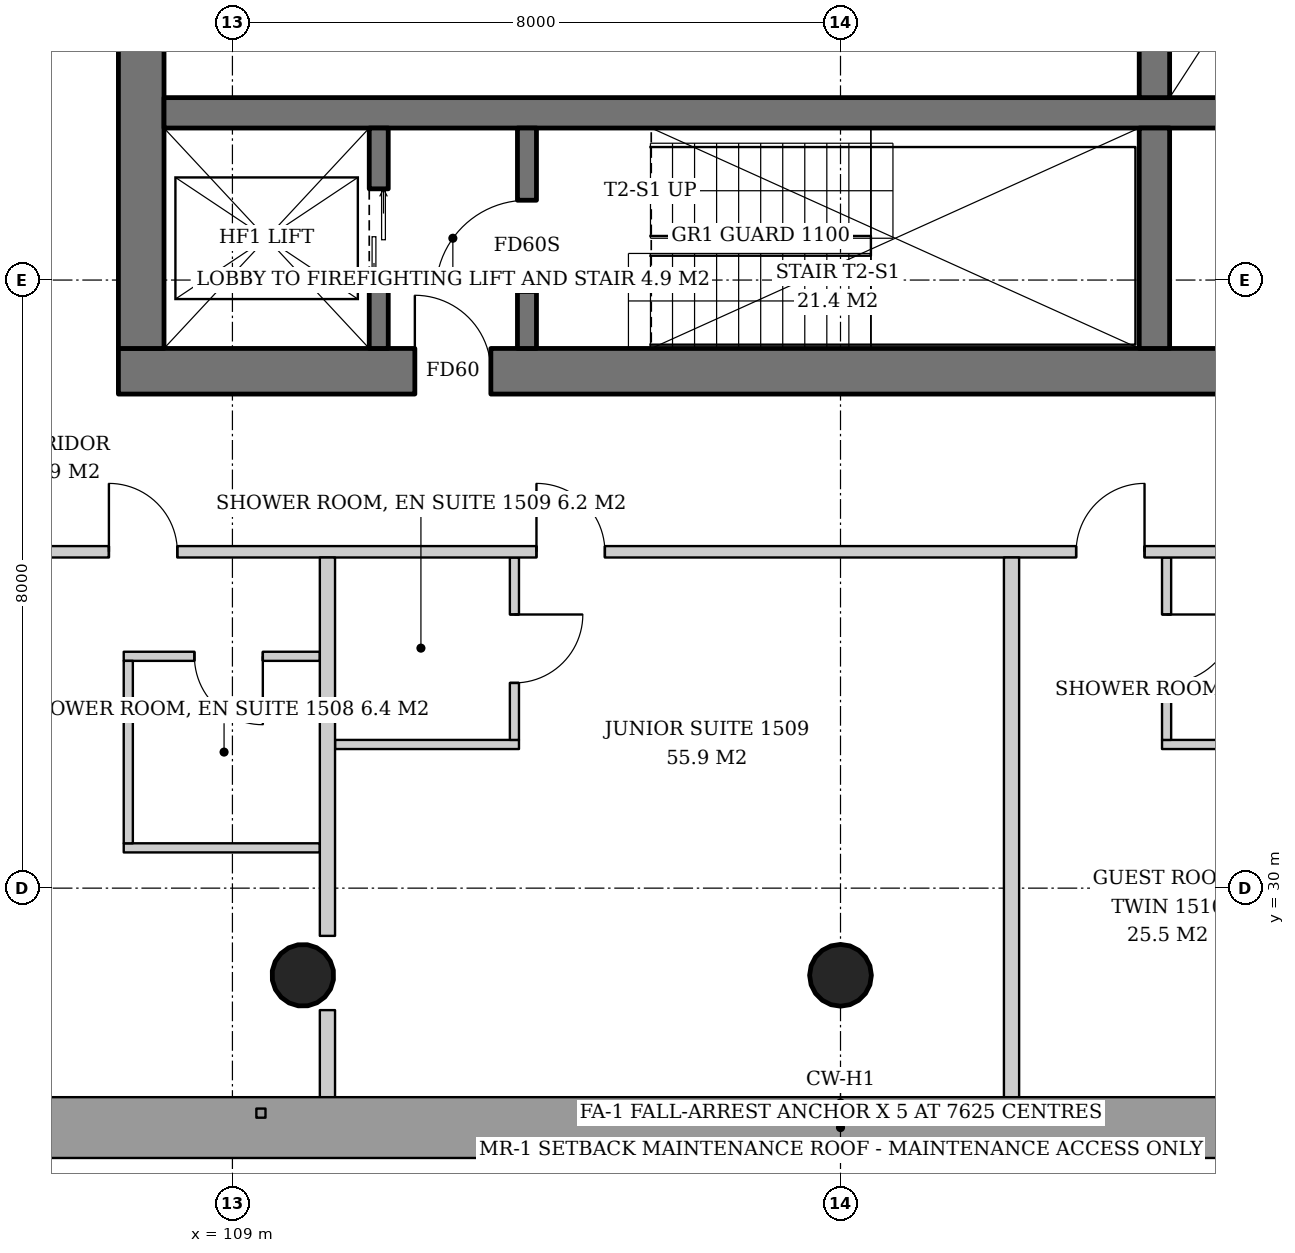
"""IFC4 building model, lengths in metres.
Left out: names, types, materials, properties, quantities, classifications, styles, units other than length and angle.
Written with IfcOpenShell. Run it as: python <this file> out.ifc"""

import sys

from ifc_helpers import new_model, si_unit, direction, frame, frame_2d, origin, origin_2d, place, context, subcontext, project, spatial, rectangle, hollow_circle, extrude, element, fill, save


model = new_model("IFC4")
c1 = context("Model", 3, precision=1e-05, world=origin(), true_north=direction((0.0, 1.0)))
c2 = subcontext(c1, "Body", "Model", "MODEL_VIEW")
j1 = project(units=[si_unit("LENGTHUNIT", "METRE"), si_unit("PLANEANGLEUNIT", "RADIAN")], contexts=[c1])
p1 = place(None, origin())
s1 = spatial("IfcSite", under=j1, at=p1, CompositionType="ELEMENT")
p2 = place(p1, origin())
s2 = spatial("IfcBuilding", under=s1, at=p2, CompositionType="ELEMENT")
p3 = place(p2, frame((0.0, 0.0, 62.8)))
s3 = spatial("IfcBuildingStorey", under=s2, at=p3, CompositionType="ELEMENT", Elevation=62.8)
p4 = place(p3, frame((109.901, 28.802, 0.0), z_axis=(0.021497706284, 0.043059584825, 0.998841188968), x_axis=(-0.894693706707, 0.446680166538, 0.0)))
e1 = element("IfcColumn", 1, at=p4, inside=s3, PredefinedType="COLUMN", context=c2, shape_type="SweptSolid", body=[
    extrude(hollow_circle(Radius=0.406, WallThickness=0.03, at=origin_2d()), origin(), (0.0, 0.0, 1.0), 3.804),
])
p5 = place(p3, frame((117.0, 28.802, 0.0), z_axis=(0.0, 0.043069538298, 0.999072076915), x_axis=(-1.0, 0.0, 0.0)))
e2 = element("IfcColumn", 2, at=p5, inside=s3, PredefinedType="COLUMN", context=c2, shape_type="SweptSolid", body=[
    extrude(hollow_circle(Radius=0.406, WallThickness=0.03, at=origin_2d()), origin(), (0.0, 0.0, 1.0), 3.803),
])
p6 = place(p3, frame((107.5, 36.8, 0.0), z_axis=(0.0, 0.0, 1.0), x_axis=(1.0, 0.0, 0.0)))
e3 = element("IfcWall", 3, at=p6, inside=s3, PredefinedType="SHEAR", context=c2, shape_type="SweptSolid", body=[
    extrude(rectangle(XDim=19.0, YDim=0.6, at=frame_2d((9.5, 0.0))), origin(), (0.0, 0.0, 1.0), 3.8),
])
p7 = place(p6, frame((3.9, 0.0, 0.0)))
e4 = element("IfcOpeningElement", 4, at=p7, cuts=e3, PredefinedType="OPENING", context=c2, shape_type="SweptSolid", body=[
    extrude(rectangle(XDim=1.0, YDim=2.1, at=frame_2d((0.5, 1.05))), frame((0.0, 0.31, 0.0), z_axis=(0.0, -1.0, 0.0), x_axis=(1.0, 0.0, 0.0)), (0.0, 0.0, 1.0), 0.62),
])
p8 = place(p6, frame((15.615, 0.0, 0.0)))
e5 = element("IfcOpeningElement", 5, at=p8, cuts=e3, PredefinedType="OPENING", context=c2, shape_type="SweptSolid", body=[
    extrude(rectangle(XDim=1.0, YDim=2.1, at=frame_2d((0.5, 1.05))), frame((0.0, 0.31, 0.0), z_axis=(0.0, -1.0, 0.0), x_axis=(1.0, 0.0, 0.0)), (0.0, 0.0, 1.0), 0.62),
])
p9 = place(p3, frame((107.8, 37.1, 0.0), z_axis=(0.0, 0.0, 1.0), x_axis=(0.0, 1.0, 0.0)))
e6 = element("IfcWall", 6, at=p9, inside=s3, PredefinedType="SHEAR", context=c2, shape_type="SweptSolid", body=[
    extrude(rectangle(XDim=17.8, YDim=0.6, at=frame_2d((8.9, 0.0))), origin(), (0.0, 0.0, 1.0), 3.8),
])
p10 = place(p9, frame((8.0, 0.0, 0.0)))
e7 = element("IfcOpeningElement", 7, at=p10, cuts=e6, PredefinedType="OPENING", context=c2, shape_type="SweptSolid", body=[
    extrude(rectangle(XDim=1.8, YDim=2.4, at=frame_2d((0.9, 1.2))), frame((0.0, 0.31, 0.0), z_axis=(0.0, -1.0, 0.0), x_axis=(1.0, 0.0, 0.0)), (0.0, 0.0, 1.0), 0.62),
])
p11 = place(p3, frame((108.1, 40.2, 0.0), z_axis=(0.0, 0.0, 1.0), x_axis=(1.0, 0.0, 0.0)))
e8 = element("IfcWall", 8, at=p11, inside=s3, PredefinedType="SHEAR", context=c2, shape_type="SweptSolid", body=[
    extrude(rectangle(XDim=17.8, YDim=0.4, at=frame_2d((8.9, 0.0))), origin(), (0.0, 0.0, 1.0), 3.8),
])
p12 = place(p3, frame((121.13, 37.1, 0.0), z_axis=(0.0, 0.0, 1.0), x_axis=(0.0, 1.0, 0.0)))
e9 = element("IfcWall", 9, at=p12, inside=s3, PredefinedType="SHEAR", context=c2, shape_type="SweptSolid", body=[
    extrude(rectangle(XDim=2.9, YDim=0.4, at=frame_2d((1.45, 0.0))), origin(), (0.0, 0.0, 1.0), 3.8),
])
p13 = place(p3, frame((121.13, 40.4, 0.0), z_axis=(0.0, 0.0, 1.0), x_axis=(0.0, 1.0, 0.0)))
e10 = element("IfcWall", 10, at=p13, inside=s3, PredefinedType="SHEAR", context=c2, shape_type="SweptSolid", body=[
    extrude(rectangle(XDim=11.2, YDim=0.4, at=frame_2d((5.6, 0.0))), origin(), (0.0, 0.0, 1.0), 3.8),
])
p14 = place(p3, frame((110.925, 37.1, 0.0), z_axis=(0.0, 0.0, 1.0), x_axis=(0.0, 1.0, 0.0)))
e11 = element("IfcWall", 11, at=p14, inside=s3, PredefinedType="SHEAR", context=c2, shape_type="SweptSolid", body=[
    extrude(rectangle(XDim=2.9, YDim=0.25, at=frame_2d((1.45, 0.0))), origin(), (0.0, 0.0, 1.0), 3.8),
])
p15 = place(p14, frame((0.8, 0.0, 0.0)))
e12 = element("IfcOpeningElement", 12, at=p15, cuts=e11, PredefinedType="OPENING", context=c2, shape_type="SweptSolid", body=[
    extrude(rectangle(XDim=1.3, YDim=2.2, at=frame_2d((0.65, 1.1))), frame((0.0, 0.135, 0.0), z_axis=(0.0, -1.0, 0.0), x_axis=(1.0, 0.0, 0.0)), (0.0, 0.0, 1.0), 0.27),
])
p16 = place(p3, frame((112.875, 37.1, 0.0), z_axis=(0.0, 0.0, 1.0), x_axis=(0.0, 1.0, 0.0)))
e13 = element("IfcWall", 13, at=p16, inside=s3, PredefinedType="SHEAR", context=c2, shape_type="SweptSolid", body=[
    extrude(rectangle(XDim=2.9, YDim=0.25, at=frame_2d((1.45, 0.0))), origin(), (0.0, 0.0, 1.0), 3.8),
])
p17 = place(p16, frame((0.75, 0.0, 0.0)))
e14 = element("IfcOpeningElement", 14, at=p17, cuts=e13, PredefinedType="OPENING", context=c2, shape_type="SweptSolid", body=[
    extrude(rectangle(XDim=1.2, YDim=2.1, at=frame_2d((0.6, 1.05))), frame((0.0, 0.135, 0.0), z_axis=(0.0, -1.0, 0.0), x_axis=(1.0, 0.0, 0.0)), (0.0, 0.0, 1.0), 0.27),
])
p18 = place(p3, frame((110.15, 33.05, 0.0), z_axis=(0.0, 0.0, 1.0), x_axis=(-1.0, 0.0, 0.0)))
e15 = element("IfcWall", 15, at=p18, inside=s3, PredefinedType="PARTITIONING", context=c2, shape_type="SweptSolid", body=[
    extrude(rectangle(XDim=2.58, YDim=0.12, at=frame_2d((1.29, 0.0))), origin(), (0.0, 0.0, 1.0), 2.8),
])
p19 = place(p18, frame((0.75, 0.0, 0.0)))
e16 = element("IfcOpeningElement", 16, at=p19, cuts=e15, PredefinedType="OPENING", context=c2, shape_type="SweptSolid", body=[
    extrude(rectangle(XDim=0.9, YDim=2.1, at=frame_2d((0.45, 1.05))), frame((0.0, 0.07, 0.0), z_axis=(0.0, -1.0, 0.0), x_axis=(1.0, 0.0, 0.0)), (0.0, 0.0, 1.0), 0.14),
])
p20 = place(p3, frame((110.15, 30.53, 0.0), z_axis=(0.0, 0.0, 1.0), x_axis=(-1.0, 0.0, 0.0)))
e17 = element("IfcWall", 17, at=p20, inside=s3, PredefinedType="PARTITIONING", context=c2, shape_type="SweptSolid", body=[
    extrude(rectangle(XDim=2.58, YDim=0.12, at=frame_2d((1.29, 0.0))), origin(), (0.0, 0.0, 1.0), 2.8),
])
p21 = place(p3, frame((107.63, 32.99, 0.0), z_axis=(0.0, 0.0, 1.0), x_axis=(0.0, -1.0, 0.0)))
e18 = element("IfcWall", 18, at=p21, inside=s3, PredefinedType="PARTITIONING", context=c2, shape_type="SweptSolid", body=[
    extrude(rectangle(XDim=2.4, YDim=0.12, at=frame_2d((1.2, 0.0))), origin(), (0.0, 0.0, 1.0), 2.8),
])
p22 = place(p3, frame((110.35, 31.89, 0.0), z_axis=(0.0, 0.0, 1.0), x_axis=(1.0, 0.0, 0.0)))
e19 = element("IfcWall", 19, at=p22, inside=s3, PredefinedType="PARTITIONING", context=c2, shape_type="SweptSolid", body=[
    extrude(rectangle(XDim=2.42, YDim=0.12, at=frame_2d((1.21, 0.0))), origin(), (0.0, 0.0, 1.0), 2.847),
])
p23 = place(p3, frame((112.71, 34.35, 0.0), z_axis=(0.0, 0.0, 1.0), x_axis=(0.0, -1.0, 0.0)))
e20 = element("IfcWall", 20, at=p23, inside=s3, PredefinedType="PARTITIONING", context=c2, shape_type="SweptSolid", body=[
    extrude(rectangle(XDim=2.4, YDim=0.12, at=frame_2d((1.2, 0.0))), origin(), (0.0, 0.0, 1.0), 3.6),
])
p24 = place(p23, frame((0.75, 0.0, 0.0)))
e21 = element("IfcOpeningElement", 21, at=p24, cuts=e20, PredefinedType="OPENING", context=c2, shape_type="SweptSolid", body=[
    extrude(rectangle(XDim=0.9, YDim=2.1, at=frame_2d((0.45, 1.05))), frame((0.0, 0.07, 0.0), z_axis=(0.0, -1.0, 0.0), x_axis=(1.0, 0.0, 0.0)), (0.0, 0.0, 1.0), 0.14),
])
p25 = place(p3, frame((121.23, 31.89, 0.0), z_axis=(0.0, 0.0, 1.0), x_axis=(1.0, 0.0, 0.0)))
e22 = element("IfcWall", 22, at=p25, inside=s3, PredefinedType="PARTITIONING", context=c2, shape_type="SweptSolid", body=[
    extrude(rectangle(XDim=2.42, YDim=0.12, at=frame_2d((1.21, 0.0))), origin(), (0.0, 0.0, 1.0), 3.6),
])
p26 = place(p3, frame((121.29, 34.35, 0.0), z_axis=(0.0, 0.0, 1.0), x_axis=(0.0, -1.0, 0.0)))
e23 = element("IfcWall", 23, at=p26, inside=s3, PredefinedType="PARTITIONING", context=c2, shape_type="SweptSolid", body=[
    extrude(rectangle(XDim=2.4, YDim=0.12, at=frame_2d((1.2, 0.0))), origin(), (0.0, 0.0, 1.0), 3.6),
])
p27 = place(p26, frame((0.75, 0.0, 0.0)))
e24 = element("IfcOpeningElement", 24, at=p27, cuts=e23, PredefinedType="OPENING", context=c2, shape_type="SweptSolid", body=[
    extrude(rectangle(XDim=0.9, YDim=2.1, at=frame_2d((0.45, 1.05))), frame((0.0, 0.07, 0.0), z_axis=(0.0, -1.0, 0.0), x_axis=(1.0, 0.0, 0.0)), (0.0, 0.0, 1.0), 0.14),
])
p28 = place(p3, frame((105.35, 34.425, 0.0), z_axis=(0.0, 0.0, 1.0), x_axis=(1.0, 0.0, 0.0)))
e25 = element("IfcWall", 25, at=p28, inside=s3, PredefinedType="PARTITIONING", context=c2, shape_type="SweptSolid", body=[
    extrude(rectangle(XDim=23.15, YDim=0.15, at=frame_2d((11.575, 0.0))), origin(), (0.0, 0.0, 1.0), 2.8),
])
p29 = place(p28, frame((2.025, 0.0, 0.0)))
e26 = element("IfcOpeningElement", 26, at=p29, cuts=e25, PredefinedType="OPENING", context=c2, shape_type="SweptSolid", body=[
    extrude(rectangle(XDim=0.9, YDim=2.1, at=frame_2d((0.45, 1.05))), frame((0.0, 0.085, 0.0), z_axis=(0.0, -1.0, 0.0), x_axis=(1.0, 0.0, 0.0)), (0.0, 0.0, 1.0), 0.17),
])
p30 = place(p28, frame((7.65, 0.0, 0.0)))
e27 = element("IfcOpeningElement", 27, at=p30, cuts=e25, PredefinedType="OPENING", context=c2, shape_type="SweptSolid", body=[
    extrude(rectangle(XDim=0.9, YDim=2.1, at=frame_2d((0.45, 1.05))), frame((0.0, 0.085, 0.0), z_axis=(0.0, -1.0, 0.0), x_axis=(1.0, 0.0, 0.0)), (0.0, 0.0, 1.0), 0.17),
])
p31 = place(p28, frame((14.75, 0.0, 0.0)))
e28 = element("IfcOpeningElement", 28, at=p31, cuts=e25, PredefinedType="OPENING", context=c2, shape_type="SweptSolid", body=[
    extrude(rectangle(XDim=0.9, YDim=2.1, at=frame_2d((0.45, 1.05))), frame((0.0, 0.085, 0.0), z_axis=(0.0, -1.0, 0.0), x_axis=(1.0, 0.0, 0.0)), (0.0, 0.0, 1.0), 0.17),
])
p32 = place(p3, frame((110.25, 34.35, 0.0), z_axis=(0.0, 0.0, 1.0), x_axis=(0.0, -1.0, 0.0)))
e29 = element("IfcWall", 29, at=p32, inside=s3, PredefinedType="PARTITIONING", context=c2, shape_type="SweptSolid", body=[
    extrude(rectangle(XDim=4.978, YDim=0.2, at=frame_2d((2.489, 0.0))), origin(), (0.0, 0.0, 1.0), 3.6),
])
p33 = place(p3, frame((110.25, 28.395, 0.0), z_axis=(0.0, 0.0, 1.0), x_axis=(0.0, -1.0, 0.0)))
e30 = element("IfcWall", 30, at=p33, inside=s3, PredefinedType="PARTITIONING", context=c2, shape_type="SweptSolid", body=[
    extrude(rectangle(XDim=1.185, YDim=0.2, at=frame_2d((0.593, 0.0))), origin(), (0.0, 0.0, 1.0), 3.6),
])
p34 = place(p3, frame((119.25, 34.35, 0.0), z_axis=(0.0, 0.0, 1.0), x_axis=(0.0, -1.0, 0.0)))
e31 = element("IfcWall", 31, at=p34, inside=s3, PredefinedType="PARTITIONING", context=c2, shape_type="SweptSolid", body=[
    extrude(rectangle(XDim=7.14, YDim=0.2, at=frame_2d((3.57, 0.0))), origin(), (0.0, 0.0, 1.0), 3.05),
])
p35 = place(p15, origin())
e32 = element("IfcDoor", 32, at=p35, inside=s3, OperationType="DOUBLE_DOOR_SLIDING", PredefinedType="DOOR", context=c2, shape_type="SweptSolid", body=[
    extrude(rectangle(XDim=1.3, YDim=2.2, at=frame_2d((0.65, 1.1))), frame((0.0, 0.025, 0.0), z_axis=(0.0, -1.0, 0.0), x_axis=(1.0, 0.0, 0.0)), (0.0, 0.0, 1.0), 0.05),
])
fill(e12, e32)
p36 = place(p17, origin())
e33 = element("IfcDoor", 33, at=p36, inside=s3, OperationType="SINGLE_SWING_LEFT", PredefinedType="DOOR", context=c2, shape_type="SweptSolid", body=[
    extrude(rectangle(XDim=1.2, YDim=2.1, at=frame_2d((0.6, 1.05))), frame((0.0, 0.025, 0.0), z_axis=(0.0, -1.0, 0.0), x_axis=(1.0, 0.0, 0.0)), (0.0, 0.0, 1.0), 0.05),
])
fill(e14, e33)
p37 = place(p7, origin())
e34 = element("IfcDoor", 34, at=p37, inside=s3, OperationType="SINGLE_SWING_LEFT", PredefinedType="DOOR", context=c2, shape_type="SweptSolid", body=[
    extrude(rectangle(XDim=1.0, YDim=2.1, at=frame_2d((0.5, 1.05))), frame((0.0, 0.025, 0.0), z_axis=(0.0, -1.0, 0.0), x_axis=(1.0, 0.0, 0.0)), (0.0, 0.0, 1.0), 0.05),
])
fill(e4, e34)
p38 = place(p19, origin())
e35 = element("IfcDoor", 35, at=p38, inside=s3, OperationType="SINGLE_SWING_LEFT", PredefinedType="DOOR", context=c2, shape_type="SweptSolid", body=[
    extrude(rectangle(XDim=0.9, YDim=2.1, at=frame_2d((0.45, 1.05))), frame((0.0, 0.025, 0.0), z_axis=(0.0, -1.0, 0.0), x_axis=(1.0, 0.0, 0.0)), (0.0, 0.0, 1.0), 0.05),
])
fill(e16, e35)
p39 = place(p24, origin())
e36 = element("IfcDoor", 36, at=p39, inside=s3, OperationType="SINGLE_SWING_LEFT", PredefinedType="DOOR", context=c2, shape_type="SweptSolid", body=[
    extrude(rectangle(XDim=0.9, YDim=2.1, at=frame_2d((0.45, 1.05))), frame((0.0, 0.025, 0.0), z_axis=(0.0, -1.0, 0.0), x_axis=(1.0, 0.0, 0.0)), (0.0, 0.0, 1.0), 0.05),
])
fill(e21, e36)
p40 = place(p27, origin())
e37 = element("IfcDoor", 37, at=p40, inside=s3, OperationType="SINGLE_SWING_LEFT", PredefinedType="DOOR", context=c2, shape_type="SweptSolid", body=[
    extrude(rectangle(XDim=0.9, YDim=2.1, at=frame_2d((0.45, 1.05))), frame((0.0, 0.025, 0.0), z_axis=(0.0, -1.0, 0.0), x_axis=(1.0, 0.0, 0.0)), (0.0, 0.0, 1.0), 0.05),
])
fill(e24, e37)
p41 = place(p29, origin())
e38 = element("IfcDoor", 38, at=p41, inside=s3, OperationType="SINGLE_SWING_LEFT", PredefinedType="DOOR", context=c2, shape_type="SweptSolid", body=[
    extrude(rectangle(XDim=0.9, YDim=2.1, at=frame_2d((0.45, 1.05))), frame((0.0, 0.025, 0.0), z_axis=(0.0, -1.0, 0.0), x_axis=(1.0, 0.0, 0.0)), (0.0, 0.0, 1.0), 0.05),
])
fill(e26, e38)
p42 = place(p30, origin())
e39 = element("IfcDoor", 39, at=p42, inside=s3, OperationType="SINGLE_SWING_LEFT", PredefinedType="DOOR", context=c2, shape_type="SweptSolid", body=[
    extrude(rectangle(XDim=0.9, YDim=2.1, at=frame_2d((0.45, 1.05))), frame((0.0, 0.025, 0.0), z_axis=(0.0, -1.0, 0.0), x_axis=(1.0, 0.0, 0.0)), (0.0, 0.0, 1.0), 0.05),
])
fill(e27, e39)
p43 = place(p31, origin())
e40 = element("IfcDoor", 40, at=p43, inside=s3, OperationType="SINGLE_SWING_RIGHT", PredefinedType="DOOR", context=c2, shape_type="SweptSolid", body=[
    extrude(rectangle(XDim=0.9, YDim=2.1, at=frame_2d((0.45, 1.05))), frame((0.0, 0.025, 0.0), z_axis=(0.0, -1.0, 0.0), x_axis=(1.0, 0.0, 0.0)), (0.0, 0.0, 1.0), 0.05),
])
fill(e28, e40)
save(model, sys.argv[1])
